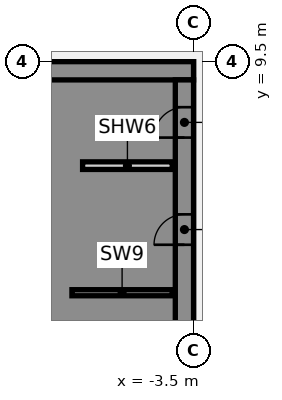
"""IFC4 building model, lengths in metres.
Left out: names, types, materials, properties, quantities, classifications, styles, units other than length and angle.
Written with IfcOpenShell. Run it as: python <this file> out.ifc"""

import sys

from ifc_helpers import new_model, si_unit, direction, frame, frame_2d, origin, place, context, subcontext, project, spatial, polyline, rectangle, outline, extrude, element, fill, save


model = new_model("IFC4")
c1 = context("Model", 3, precision=1e-05, world=origin(), true_north=direction((0.0, 1.0)))
c2 = subcontext(c1, "Body", "Model", "MODEL_VIEW")
j1 = project(units=[si_unit("LENGTHUNIT", "METRE"), si_unit("PLANEANGLEUNIT", "RADIAN")], contexts=[c1])
p1 = place(None, origin())
s1 = spatial("IfcSite", under=j1, at=p1, CompositionType="ELEMENT")
p2 = place(p1, origin())
s2 = spatial("IfcBuilding", under=s1, at=p2, CompositionType="ELEMENT")
p3 = place(p2, frame((0.0, 0.0, 94.75)))
s3 = spatial("IfcBuildingStorey", under=s2, at=p3, CompositionType="ELEMENT", Elevation=94.75)
p4 = place(p3, frame((-16.5, 9.2, 0.0), z_axis=(0.0, 0.0, 1.0), x_axis=(1.0, 0.0, 0.0)))
e1 = element("IfcWall", 1, at=p4, inside=s3, PredefinedType="SHEAR", context=c2, shape_type="SweptSolid", body=[
    extrude(rectangle(XDim=13.0, YDim=0.6, at=frame_2d((6.5, 0.0))), origin(), (0.0, 0.0, 1.0), 3.61),
])
p5 = place(p3, origin())
e2 = element("IfcWall", 2, at=p5, inside=s3, PredefinedType="SHEAR", context=c2, shape_type="SweptSolid", body=[
    extrude(outline(polyline([(-9.8, -5.375), (-9.8, -5.625), (-7.5, -5.625), (-7.2, -5.625), (-7.2, 8.9), (-7.5, 8.9), (-9.8, 8.9), (-9.8, 8.125), (-7.5, 8.125), (-7.5, 5.625), (-9.8, 5.625), (-9.8, 5.375), (-7.5, 5.375), (-7.5, 2.875), (-9.8, 2.875), (-9.8, 2.625), (-7.5, 2.625), (-7.5, 0.125), (-9.8, 0.125), (-9.8, -0.125), (-7.5, -0.125), (-7.5, -2.625), (-9.8, -2.625), (-9.8, -2.875), (-7.5, -2.875), (-7.5, -5.375), (-9.8, -5.375)])), origin(), (0.0, 0.0, 1.0), 3.61),
])
p6 = place(p3, frame((-7.5, 1.9, 0.0), z_axis=(0.0, 0.0, 1.0), x_axis=(1.0, 0.0, 0.0)))
e3 = element("IfcWall", 3, at=p6, inside=s3, PredefinedType="SHEAR", context=c2, shape_type="SweptSolid", body=[
    extrude(rectangle(XDim=3.3, YDim=0.2, at=frame_2d((1.65, 0.0))), origin(), (0.0, 0.0, 1.0), 3.61),
])
p7 = place(p3, frame((-3.8, -8.9, 0.0), z_axis=(0.0, 0.0, 1.0), x_axis=(0.0, 1.0, 0.0)))
e4 = element("IfcWall", 4, at=p7, inside=s3, PredefinedType="SHEAR", context=c2, shape_type="SweptSolid", body=[
    extrude(rectangle(XDim=17.8, YDim=0.6, at=frame_2d((8.9, 0.0))), origin(), (0.0, 0.0, 1.0), 3.61),
])
p8 = place(p7, frame((1.25, 0.0, 0.0)))
e5 = element("IfcOpeningElement", 5, at=p8, cuts=e4, PredefinedType="OPENING", context=c2, shape_type="SweptSolid", body=[
    extrude(rectangle(XDim=1.8, YDim=2.1, at=frame_2d((0.9, 1.05))), frame((0.0, 0.31, 0.0), z_axis=(0.0, -1.0, 0.0), x_axis=(1.0, 0.0, 0.0)), (0.0, 0.0, 1.0), 0.62),
])
p9 = place(p7, frame((12.377, 0.0, 0.0)))
e6 = element("IfcOpeningElement", 6, at=p9, cuts=e4, PredefinedType="OPENING", context=c2, shape_type="SweptSolid", body=[
    extrude(rectangle(XDim=1.0, YDim=2.1, at=frame_2d((0.5, 1.05))), frame((0.0, 0.31, 0.0), z_axis=(0.0, -1.0, 0.0), x_axis=(1.0, 0.0, 0.0)), (0.0, 0.0, 1.0), 0.62),
])
p10 = place(p7, frame((15.903, 0.0, 0.0)))
e7 = element("IfcOpeningElement", 7, at=p10, cuts=e4, PredefinedType="OPENING", context=c2, shape_type="SweptSolid", body=[
    extrude(rectangle(XDim=1.0, YDim=2.1, at=frame_2d((0.5, 1.05))), frame((0.0, 0.31, 0.0), z_axis=(0.0, -1.0, 0.0), x_axis=(1.0, 0.0, 0.0)), (0.0, 0.0, 1.0), 0.62),
])
p11 = place(p3, frame((-7.15, 6.08, 0.0), z_axis=(0.0, 0.0, 1.0), x_axis=(1.0, 0.0, 0.0)))
e8 = element("IfcWall", 8, at=p11, inside=s3, PredefinedType="PARTITIONING", context=c2, shape_type="SweptSolid", body=[
    extrude(rectangle(XDim=2.95, YDim=0.25, at=frame_2d((1.475, 0.0))), origin(), (0.0, 0.0, 1.0), 3.61),
])
p12 = place(p9, origin())
e9 = element("IfcDoor", 9, at=p12, inside=s3, OperationType="SINGLE_SWING_LEFT", PredefinedType="DOOR", context=c2, shape_type="SweptSolid", body=[
    extrude(rectangle(XDim=1.0, YDim=2.1, at=frame_2d((0.5, 1.05))), frame((0.0, 0.275, 0.0), z_axis=(0.0, -1.0, 0.0), x_axis=(1.0, 0.0, 0.0)), (0.0, 0.0, 1.0), 0.05),
])
fill(e6, e9)
p13 = place(p10, origin())
e10 = element("IfcDoor", 10, at=p13, inside=s3, OperationType="SINGLE_SWING_LEFT", PredefinedType="DOOR", context=c2, shape_type="SweptSolid", body=[
    extrude(rectangle(XDim=1.0, YDim=2.1, at=frame_2d((0.5, 1.05))), frame((0.0, 0.275, 0.0), z_axis=(0.0, -1.0, 0.0), x_axis=(1.0, 0.0, 0.0)), (0.0, 0.0, 1.0), 0.05),
])
fill(e7, e10)
save(model, sys.argv[1])
